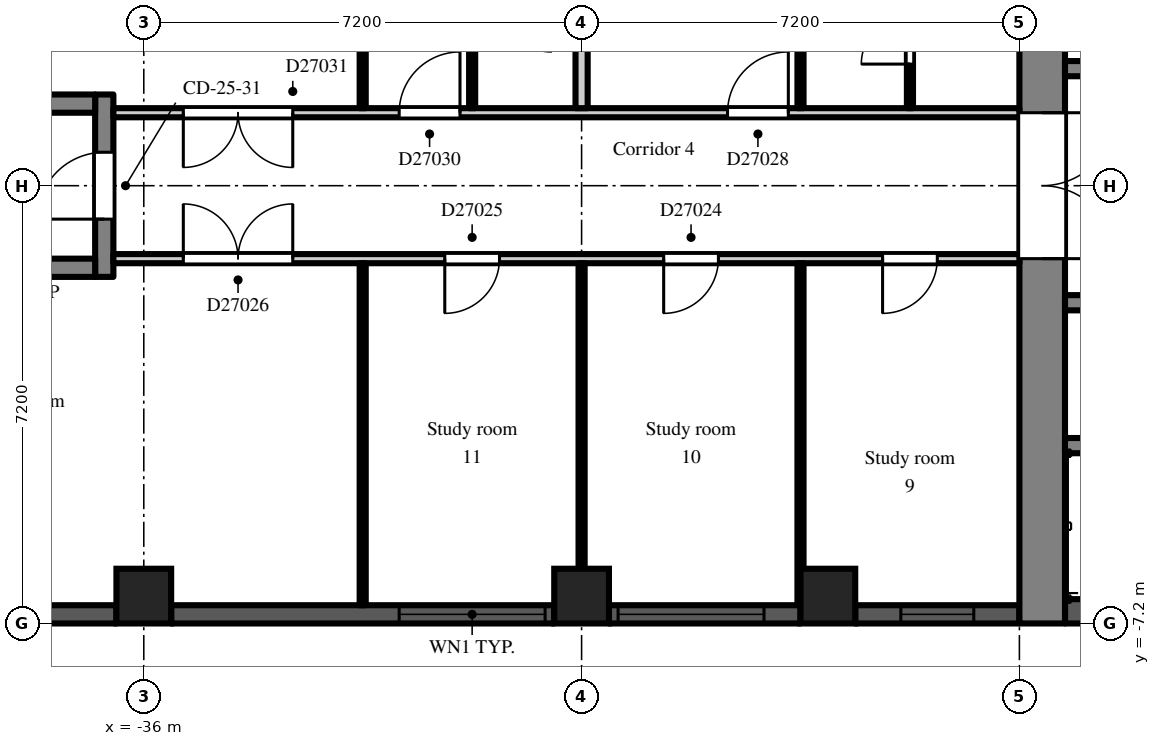
"""IFC4 building model, lengths in metres.
Left out: names, types, materials, properties, quantities, classifications, styles, units other than length and angle.
Written with IfcOpenShell. Run it as: python <this file> out.ifc"""

import sys

from ifc_helpers import new_model, si_unit, direction, frame, frame_2d, origin, origin_2d, place, context, subcontext, project, spatial, rectangle, extrude, element, fill, save


model = new_model("IFC4")
c1 = context("Model", 3, precision=1e-05, world=origin(), true_north=direction((0.0, 1.0)))
c2 = subcontext(c1, "Body", "Model", "MODEL_VIEW")
j1 = project(units=[si_unit("LENGTHUNIT", "METRE"), si_unit("PLANEANGLEUNIT", "RADIAN")], contexts=[c1])
p1 = place(None, origin())
s1 = spatial("IfcSite", under=j1, at=p1, CompositionType="ELEMENT")
p2 = place(p1, origin())
s2 = spatial("IfcBuilding", under=s1, at=p2, CompositionType="ELEMENT")
p3 = place(p2, frame((0.0, 0.0, 191.7)))
s3 = spatial("IfcBuildingStorey", under=s2, at=p3, CompositionType="ELEMENT", Elevation=191.7)
for number, where, z_axis, x_axis in (
    (1, (-36.0, -6.75, 0.0), (0.0, 0.0, 1.0), (1.0, 0.0, 0.0)),
    (2, (-28.8, -6.75, 0.0), (0.0, 0.0, 1.0), (1.0, 0.0, 0.0)),
    (3, (-24.75, -6.75, 0.0), (0.0, 0.0, 1.0), (1.0, 0.0, 0.0)),
):
    element("IfcColumn", number, at=place(p3, frame(where, z_axis=z_axis, x_axis=x_axis)), inside=s3, PredefinedType="COLUMN", context=c2, shape_type="SweptSolid", body=[
        extrude(rectangle(XDim=0.9, YDim=0.9, at=origin_2d()), origin(), (0.0, 0.0, 1.0), 3.0),
    ])
p4 = place(p3, frame((-38.7, -7.05, 0.0), z_axis=(0.0, 0.0, 1.0), x_axis=(1.0, 0.0, 0.0)))
e4 = element("IfcWall", 4, at=p4, inside=s3, PredefinedType="SOLIDWALL", context=c2, shape_type="SweptSolid", body=[
    extrude(rectangle(XDim=2.25, YDim=0.3, at=frame_2d((1.125, 0.0))), origin(), (0.0, 0.0, 1.0), 2.3),
])
p5 = place(p3, frame((-35.55, -7.05, 0.0), z_axis=(0.0, 0.0, 1.0), x_axis=(1.0, 0.0, 0.0)))
e5 = element("IfcWall", 5, at=p5, inside=s3, PredefinedType="SOLIDWALL", context=c2, shape_type="SweptSolid", body=[
    extrude(rectangle(XDim=6.3, YDim=0.3, at=frame_2d((3.15, 0.0))), origin(), (0.0, 0.0, 1.0), 2.3),
])
p6 = place(p5, frame((3.75, 0.0, 0.2)))
e6 = element("IfcOpeningElement", 6, at=p6, cuts=e5, PredefinedType="OPENING", context=c2, shape_type="SweptSolid", body=[
    extrude(rectangle(XDim=2.4, YDim=1.85, at=frame_2d((1.2, 0.925))), frame((0.0, 0.16, 0.0), z_axis=(0.0, -1.0, 0.0), x_axis=(1.0, 0.0, 0.0)), (0.0, 0.0, 1.0), 0.32),
])
p7 = place(p3, frame((-28.35, -7.05, 0.0), z_axis=(0.0, 0.0, 1.0), x_axis=(1.0, 0.0, 0.0)))
e7 = element("IfcWall", 7, at=p7, inside=s3, PredefinedType="SOLIDWALL", context=c2, shape_type="SweptSolid", body=[
    extrude(rectangle(XDim=3.15, YDim=0.3, at=frame_2d((1.575, 0.0))), origin(), (0.0, 0.0, 1.0), 2.3),
])
p8 = place(p7, frame((0.15, 0.0, 0.2)))
e8 = element("IfcOpeningElement", 8, at=p8, cuts=e7, PredefinedType="OPENING", context=c2, shape_type="SweptSolid", body=[
    extrude(rectangle(XDim=2.4, YDim=1.85, at=frame_2d((1.2, 0.925))), frame((0.0, 0.16, 0.0), z_axis=(0.0, -1.0, 0.0), x_axis=(1.0, 0.0, 0.0)), (0.0, 0.0, 1.0), 0.32),
])
p9 = place(p3, frame((-24.3, -7.05, 0.0), z_axis=(0.0, 0.0, 1.0), x_axis=(1.0, 0.0, 0.0)))
e9 = element("IfcWall", 9, at=p9, inside=s3, PredefinedType="SOLIDWALL", context=c2, shape_type="SweptSolid", body=[
    extrude(rectangle(XDim=2.7, YDim=0.3, at=frame_2d((1.35, 0.0))), origin(), (0.0, 0.0, 1.0), 2.3),
])
p10 = place(p9, frame((0.75, 0.0, 0.2)))
e10 = element("IfcOpeningElement", 10, at=p10, cuts=e9, PredefinedType="OPENING", context=c2, shape_type="SweptSolid", body=[
    extrude(rectangle(XDim=1.2, YDim=1.85, at=frame_2d((0.6, 0.925))), frame((0.0, 0.16, 0.0), z_axis=(0.0, -1.0, 0.0), x_axis=(1.0, 0.0, 0.0)), (0.0, 0.0, 1.0), 0.32),
])
p11 = place(p3, frame((-21.225, -7.2, 0.0), z_axis=(0.0, 0.0, 1.0), x_axis=(0.0, 1.0, 0.0)))
e11 = element("IfcWall", 11, at=p11, inside=s3, PredefinedType="SHEAR", context=c2, shape_type="SweptSolid", body=[
    extrude(rectangle(XDim=14.4, YDim=0.75, at=frame_2d((7.2, 0.0))), origin(), (0.0, 0.0, 1.0), 2.55),
])
p12 = place(p11, frame((6.0, 0.0, 0.0)))
e12 = element("IfcOpeningElement", 12, at=p12, cuts=e11, PredefinedType="OPENING", context=c2, shape_type="SweptSolid", body=[
    extrude(rectangle(XDim=2.4, YDim=2.2, at=frame_2d((1.2, 1.1))), frame((0.0, 0.385, 0.0), z_axis=(0.0, -1.0, 0.0), x_axis=(1.0, 0.0, 0.0)), (0.0, 0.0, 1.0), 0.77),
])
p13 = place(p3, frame((-7.9, 1.925, 0.0), z_axis=(0.0, 0.0, 1.0), x_axis=(-1.0, 0.0, 0.0)))
e13 = element("IfcWall", 13, at=p13, inside=s3, PredefinedType="SHEAR", context=c2, shape_type="SweptSolid", body=[
    extrude(rectangle(XDim=12.95, YDim=0.25, at=frame_2d((6.475, 0.0))), origin(), (0.0, 0.0, 1.0), 2.55),
])
p14 = place(p13, frame((4.825, 0.0, 0.0)))
e14 = element("IfcOpeningElement", 14, at=p14, cuts=e13, PredefinedType="OPENING", context=c2, shape_type="SweptSolid", body=[
    extrude(rectangle(XDim=1.1, YDim=2.1, at=frame_2d((0.55, 1.05))), frame((0.0, 0.135, 0.0), z_axis=(0.0, -1.0, 0.0), x_axis=(1.0, 0.0, 0.0)), (0.0, 0.0, 1.0), 0.27),
])
p15 = place(p13, frame((7.025, 0.0, 0.0)))
e15 = element("IfcOpeningElement", 15, at=p15, cuts=e13, PredefinedType="OPENING", context=c2, shape_type="SweptSolid", body=[
    extrude(rectangle(XDim=1.1, YDim=2.1, at=frame_2d((0.55, 1.05))), frame((0.0, 0.135, 0.0), z_axis=(0.0, -1.0, 0.0), x_axis=(1.0, 0.0, 0.0)), (0.0, 0.0, 1.0), 0.27),
])
p16 = place(p13, frame((9.225, 0.0, 0.0)))
e16 = element("IfcOpeningElement", 16, at=p16, cuts=e13, PredefinedType="OPENING", context=c2, shape_type="SweptSolid", body=[
    extrude(rectangle(XDim=1.1, YDim=2.1, at=frame_2d((0.55, 1.05))), frame((0.0, 0.135, 0.0), z_axis=(0.0, -1.0, 0.0), x_axis=(1.0, 0.0, 0.0)), (0.0, 0.0, 1.0), 0.27),
])
p17 = place(p13, frame((0.525, 0.0, 0.0)))
e17 = element("IfcOpeningElement", 17, at=p17, cuts=e13, PredefinedType="OPENING", context=c2, shape_type="SweptSolid", body=[
    extrude(rectangle(XDim=0.9, YDim=2.1, at=frame_2d((0.45, 1.05))), frame((0.0, 0.135, 0.0), z_axis=(0.0, -1.0, 0.0), x_axis=(1.0, 0.0, 0.0)), (0.0, 0.0, 1.0), 0.27),
])
p18 = place(p13, frame((2.625, 0.0, 0.0)))
e18 = element("IfcOpeningElement", 18, at=p18, cuts=e13, PredefinedType="OPENING", context=c2, shape_type="SweptSolid", body=[
    extrude(rectangle(XDim=1.1, YDim=2.1, at=frame_2d((0.55, 1.05))), frame((0.0, 0.135, 0.0), z_axis=(0.0, -1.0, 0.0), x_axis=(1.0, 0.0, 0.0)), (0.0, 0.0, 1.0), 0.27),
])
p19 = place(p13, frame((11.525, 0.0, 0.0)))
e19 = element("IfcOpeningElement", 19, at=p19, cuts=e13, PredefinedType="OPENING", context=c2, shape_type="SweptSolid", body=[
    extrude(rectangle(XDim=0.9, YDim=2.1, at=frame_2d((0.45, 1.05))), frame((0.0, 0.135, 0.0), z_axis=(0.0, -1.0, 0.0), x_axis=(1.0, 0.0, 0.0)), (0.0, 0.0, 1.0), 0.27),
])
p20 = place(p3, frame((-7.9, -7.0, 0.0), z_axis=(0.0, 0.0, 1.0), x_axis=(-1.0, 0.0, 0.0)))
e20 = element("IfcWall", 20, at=p20, inside=s3, PredefinedType="SHEAR", context=c2, shape_type="SweptSolid", body=[
    extrude(rectangle(XDim=12.95, YDim=0.4, at=frame_2d((6.475, 0.0))), origin(), (0.0, 0.0, 1.0), 2.55),
])
p21 = place(p3, frame((-7.9, -1.925, 0.0), z_axis=(0.0, 0.0, 1.0), x_axis=(-1.0, 0.0, 0.0)))
e21 = element("IfcWall", 21, at=p21, inside=s3, PredefinedType="SHEAR", context=c2, shape_type="SweptSolid", body=[
    extrude(rectangle(XDim=12.95, YDim=0.25, at=frame_2d((6.475, 0.0))), origin(), (0.0, 0.0, 1.0), 2.55),
])
p22 = place(p21, frame((0.525, 0.0, 0.0)))
e22 = element("IfcOpeningElement", 22, at=p22, cuts=e21, PredefinedType="OPENING", context=c2, shape_type="SweptSolid", body=[
    extrude(rectangle(XDim=0.9, YDim=2.1, at=frame_2d((0.45, 1.05))), frame((0.0, 0.135, 0.0), z_axis=(0.0, -1.0, 0.0), x_axis=(1.0, 0.0, 0.0)), (0.0, 0.0, 1.0), 0.27),
])
p23 = place(p21, frame((2.625, 0.0, 0.0)))
e23 = element("IfcOpeningElement", 23, at=p23, cuts=e21, PredefinedType="OPENING", context=c2, shape_type="SweptSolid", body=[
    extrude(rectangle(XDim=1.1, YDim=2.1, at=frame_2d((0.55, 1.05))), frame((0.0, 0.135, 0.0), z_axis=(0.0, -1.0, 0.0), x_axis=(1.0, 0.0, 0.0)), (0.0, 0.0, 1.0), 0.27),
])
p24 = place(p21, frame((8.225, 0.0, 0.0)))
e24 = element("IfcOpeningElement", 24, at=p24, cuts=e21, PredefinedType="OPENING", context=c2, shape_type="SweptSolid", body=[
    extrude(rectangle(XDim=0.9, YDim=2.1, at=frame_2d((0.45, 1.05))), frame((0.0, 0.135, 0.0), z_axis=(0.0, -1.0, 0.0), x_axis=(1.0, 0.0, 0.0)), (0.0, 0.0, 1.0), 0.27),
])
p25 = place(p3, frame((-12.3, -4.275, 0.0), z_axis=(0.0, 0.0, 1.0), x_axis=(-1.0, 0.0, 0.0)))
e25 = element("IfcWall", 25, at=p25, inside=s3, PredefinedType="SHEAR", context=c2, shape_type="SweptSolid", body=[
    extrude(rectangle(XDim=8.55, YDim=0.25, at=frame_2d((4.275, 0.0))), origin(), (0.0, 0.0, 1.0), 2.55),
])
p26 = place(p3, frame((-36.65, -1.5, 0.0), z_axis=(0.0, 0.0, 1.0), x_axis=(0.0, 1.0, 0.0)))
e26 = element("IfcWall", 26, at=p26, inside=s3, PredefinedType="SHEAR", context=c2, shape_type="SweptSolid", body=[
    extrude(rectangle(XDim=3.0, YDim=0.3, at=frame_2d((1.5, 0.0))), origin(), (0.0, 0.0, 1.0), 2.55),
])
p27 = place(p26, frame((0.95, 0.0, 0.0)))
e27 = element("IfcOpeningElement", 27, at=p27, cuts=e26, PredefinedType="OPENING", context=c2, shape_type="SweptSolid", body=[
    extrude(rectangle(XDim=1.1, YDim=2.1, at=frame_2d((0.55, 1.05))), frame((0.0, 0.16, 0.0), z_axis=(0.0, -1.0, 0.0), x_axis=(1.0, 0.0, 0.0)), (0.0, 0.0, 1.0), 0.32),
])
for number, where, z_axis, x_axis in (
    (28, (-36.8, -1.35, 0.0), (0.0, 0.0, 1.0), (-1.0, 0.0, 0.0)),
    (29, (-36.8, 1.35, 0.0), (0.0, 0.0, 1.0), (-1.0, 0.0, 0.0)),
):
    element("IfcWall", number, at=place(p3, frame(where, z_axis=z_axis, x_axis=x_axis)), inside=s3, PredefinedType="SHEAR", context=c2, shape_type="SweptSolid", body=[
        extrude(rectangle(XDim=5.8, YDim=0.3, at=frame_2d((2.9, 0.0))), origin(), (0.0, 0.0, 1.0), 2.55),
    ])
p28 = place(p3, frame((-36.5, -1.2, 0.0), z_axis=(0.0, 0.0, 1.0), x_axis=(1.0, 0.0, 0.0)))
e30 = element("IfcWall", 30, at=p28, inside=s3, PredefinedType="PARTITIONING", context=c2, shape_type="SweptSolid", body=[
    extrude(rectangle(XDim=14.9, YDim=0.15, at=frame_2d((7.45, 0.0))), origin(), (0.0, 0.0, 1.0), 2.55),
])
p29 = place(p28, frame((12.65, 0.0, 0.0)))
e31 = element("IfcOpeningElement", 31, at=p29, cuts=e30, PredefinedType="OPENING", context=c2, shape_type="SweptSolid", body=[
    extrude(rectangle(XDim=0.9, YDim=2.1, at=frame_2d((0.45, 1.05))), frame((0.0, 0.085, 0.0), z_axis=(0.0, -1.0, 0.0), x_axis=(1.0, 0.0, 0.0)), (0.0, 0.0, 1.0), 0.17),
])
p30 = place(p28, frame((9.05, 0.0, 0.0)))
e32 = element("IfcOpeningElement", 32, at=p30, cuts=e30, PredefinedType="OPENING", context=c2, shape_type="SweptSolid", body=[
    extrude(rectangle(XDim=0.9, YDim=2.1, at=frame_2d((0.45, 1.05))), frame((0.0, 0.085, 0.0), z_axis=(0.0, -1.0, 0.0), x_axis=(1.0, 0.0, 0.0)), (0.0, 0.0, 1.0), 0.17),
])
p31 = place(p28, frame((5.45, 0.0, 0.0)))
e33 = element("IfcOpeningElement", 33, at=p31, cuts=e30, PredefinedType="OPENING", context=c2, shape_type="SweptSolid", body=[
    extrude(rectangle(XDim=0.9, YDim=2.1, at=frame_2d((0.45, 1.05))), frame((0.0, 0.085, 0.0), z_axis=(0.0, -1.0, 0.0), x_axis=(1.0, 0.0, 0.0)), (0.0, 0.0, 1.0), 0.17),
])
p32 = place(p28, frame((1.15, 0.0, 0.0)))
e34 = element("IfcOpeningElement", 34, at=p32, cuts=e30, PredefinedType="OPENING", context=c2, shape_type="SweptSolid", body=[
    extrude(rectangle(XDim=1.8, YDim=2.1, at=frame_2d((0.9, 1.05))), frame((0.0, 0.085, 0.0), z_axis=(0.0, -1.0, 0.0), x_axis=(1.0, 0.0, 0.0)), (0.0, 0.0, 1.0), 0.17),
])
p33 = place(p3, frame((-36.5, 1.2, 0.0), z_axis=(0.0, 0.0, 1.0), x_axis=(1.0, 0.0, 0.0)))
e35 = element("IfcWall", 35, at=p33, inside=s3, PredefinedType="PARTITIONING", context=c2, shape_type="SweptSolid", body=[
    extrude(rectangle(XDim=14.9, YDim=0.15, at=frame_2d((7.45, 0.0))), origin(), (0.0, 0.0, 1.0), 2.55),
])
p34 = place(p33, frame((10.1, 0.0, 0.0)))
e36 = element("IfcOpeningElement", 36, at=p34, cuts=e35, PredefinedType="OPENING", context=c2, shape_type="SweptSolid", body=[
    extrude(rectangle(XDim=1.0, YDim=2.1, at=frame_2d((0.5, 1.05))), frame((0.0, 0.085, 0.0), z_axis=(0.0, -1.0, 0.0), x_axis=(1.0, 0.0, 0.0)), (0.0, 0.0, 1.0), 0.17),
])
p35 = place(p33, frame((4.7, 0.0, 0.0)))
e37 = element("IfcOpeningElement", 37, at=p35, cuts=e35, PredefinedType="OPENING", context=c2, shape_type="SweptSolid", body=[
    extrude(rectangle(XDim=1.0, YDim=2.1, at=frame_2d((0.5, 1.05))), frame((0.0, 0.085, 0.0), z_axis=(0.0, -1.0, 0.0), x_axis=(1.0, 0.0, 0.0)), (0.0, 0.0, 1.0), 0.17),
])
p36 = place(p33, frame((1.15, 0.0, 0.0)))
e38 = element("IfcOpeningElement", 38, at=p36, cuts=e35, PredefinedType="OPENING", context=c2, shape_type="SweptSolid", body=[
    extrude(rectangle(XDim=1.8, YDim=2.1, at=frame_2d((0.9, 1.05))), frame((0.0, 0.085, 0.0), z_axis=(0.0, -1.0, 0.0), x_axis=(1.0, 0.0, 0.0)), (0.0, 0.0, 1.0), 0.17),
])
for number, where, z_axis, x_axis in (
    (39, (-32.4, -6.9, 0.0), (0.0, 0.0, 1.0), (0.0, 1.0, 0.0)),
    (40, (-32.4, 1.275, 0.0), (0.0, 0.0, 1.0), (0.0, 1.0, 0.0)),
):
    element("IfcWall", number, at=place(p3, frame(where, z_axis=z_axis, x_axis=x_axis)), inside=s3, PredefinedType="PARTITIONING", context=c2, shape_type="SweptSolid", body=[
        extrude(rectangle(XDim=5.625, YDim=0.1, at=frame_2d((2.812, 0.0))), origin(), (0.0, 0.0, 1.0), 2.55),
    ])
p37 = place(p3, frame((-30.6, 1.275, 0.0), z_axis=(0.0, 0.0, 1.0), x_axis=(0.0, 1.0, 0.0)))
e41 = element("IfcWall", 41, at=p37, inside=s3, PredefinedType="PARTITIONING", context=c2, shape_type="SweptSolid", body=[
    extrude(rectangle(XDim=1.775, YDim=0.1, at=frame_2d((0.888, 0.0))), origin(), (0.0, 0.0, 1.0), 2.55),
])
p38 = place(p3, frame((-28.8, -6.9, 0.0), z_axis=(0.0, 0.0, 1.0), x_axis=(0.0, 1.0, 0.0)))
e42 = element("IfcWall", 42, at=p38, inside=s3, PredefinedType="PARTITIONING", context=c2, shape_type="SweptSolid", body=[
    extrude(rectangle(XDim=5.625, YDim=0.1, at=frame_2d((2.812, 0.0))), origin(), (0.0, 0.0, 1.0), 2.55),
])
p39 = place(p3, frame((-28.8, 1.275, 0.0), z_axis=(0.0, 0.0, 1.0), x_axis=(0.0, 1.0, 0.0)))
e43 = element("IfcWall", 43, at=p39, inside=s3, PredefinedType="PARTITIONING", context=c2, shape_type="SweptSolid", body=[
    extrude(rectangle(XDim=5.625, YDim=0.2, at=frame_2d((2.812, 0.0))), origin(), (0.0, 0.0, 1.0), 2.55),
])
p40 = place(p3, frame((-25.2, -6.9, 0.0), z_axis=(0.0, 0.0, 1.0), x_axis=(0.0, 1.0, 0.0)))
e44 = element("IfcWall", 44, at=p40, inside=s3, PredefinedType="PARTITIONING", context=c2, shape_type="SweptSolid", body=[
    extrude(rectangle(XDim=5.625, YDim=0.1, at=frame_2d((2.812, 0.0))), origin(), (0.0, 0.0, 1.0), 2.55),
])
p41 = place(p3, frame((-25.2, 1.275, 0.0), z_axis=(0.0, 0.0, 1.0), x_axis=(0.0, 1.0, 0.0)))
e45 = element("IfcWall", 45, at=p41, inside=s3, PredefinedType="PARTITIONING", context=c2, shape_type="SweptSolid", body=[
    extrude(rectangle(XDim=2.375, YDim=0.1, at=frame_2d((1.188, 0.0))), origin(), (0.0, 0.0, 1.0), 2.55),
])
p42 = place(p3, frame((-23.4, 1.275, 0.0), z_axis=(0.0, 0.0, 1.0), x_axis=(0.0, 1.0, 0.0)))
e46 = element("IfcWall", 46, at=p42, inside=s3, PredefinedType="PARTITIONING", context=c2, shape_type="SweptSolid", body=[
    extrude(rectangle(XDim=2.275, YDim=0.1, at=frame_2d((1.138, 0.0))), origin(), (0.0, 0.0, 1.0), 2.55),
])
p43 = place(p42, frame((0.725, 0.0, 0.0)))
e47 = element("IfcOpeningElement", 47, at=p43, cuts=e46, PredefinedType="OPENING", context=c2, shape_type="SweptSolid", body=[
    extrude(rectangle(XDim=0.8, YDim=2.1, at=frame_2d((0.4, 1.05))), frame((0.0, 0.06, 0.0), z_axis=(0.0, -1.0, 0.0), x_axis=(1.0, 0.0, 0.0)), (0.0, 0.0, 1.0), 0.12),
])
p44 = place(p6, origin())
e48 = element("IfcWindow", 48, at=p44, inside=s3, PartitioningType="SINGLE_PANEL", PredefinedType="WINDOW", context=c2, shape_type="SweptSolid", body=[
    extrude(rectangle(XDim=2.4, YDim=1.85, at=frame_2d((1.2, 0.925))), frame((0.0, 0.03, 0.0), z_axis=(0.0, -1.0, 0.0), x_axis=(1.0, 0.0, 0.0)), (0.0, 0.0, 1.0), 0.06),
])
fill(e6, e48)
p45 = place(p8, origin())
e49 = element("IfcWindow", 49, at=p45, inside=s3, PartitioningType="SINGLE_PANEL", PredefinedType="WINDOW", context=c2, shape_type="SweptSolid", body=[
    extrude(rectangle(XDim=2.4, YDim=1.85, at=frame_2d((1.2, 0.925))), frame((0.0, 0.03, 0.0), z_axis=(0.0, -1.0, 0.0), x_axis=(1.0, 0.0, 0.0)), (0.0, 0.0, 1.0), 0.06),
])
fill(e8, e49)
p46 = place(p10, origin())
e50 = element("IfcWindow", 50, at=p46, inside=s3, PartitioningType="SINGLE_PANEL", PredefinedType="WINDOW", context=c2, shape_type="SweptSolid", body=[
    extrude(rectangle(XDim=1.2, YDim=1.85, at=frame_2d((0.6, 0.925))), frame((0.0, 0.03, 0.0), z_axis=(0.0, -1.0, 0.0), x_axis=(1.0, 0.0, 0.0)), (0.0, 0.0, 1.0), 0.06),
])
fill(e10, e50)
p47 = place(p12, frame((2.4, 0.0, 0.0), z_axis=(0.0, 0.0, 1.0), x_axis=(-1.0, 0.0, 0.0)))
e51 = element("IfcDoor", 51, at=p47, inside=s3, OperationType="DOUBLE_DOOR_DOUBLE_SWING", PredefinedType="DOOR", context=c2, shape_type="SweptSolid", body=[
    extrude(rectangle(XDim=2.4, YDim=2.2, at=frame_2d((1.2, 1.1))), frame((0.0, 0.025, 0.0), z_axis=(0.0, -1.0, 0.0), x_axis=(1.0, 0.0, 0.0)), (0.0, 0.0, 1.0), 0.05),
])
fill(e12, e51)
p48 = place(p27, origin())
e52 = element("IfcDoor", 52, at=p48, inside=s3, OperationType="SINGLE_SWING_LEFT", PredefinedType="DOOR", context=c2, shape_type="SweptSolid", body=[
    extrude(rectangle(XDim=1.1, YDim=2.1, at=frame_2d((0.55, 1.05))), frame((0.0, 0.025, 0.0), z_axis=(0.0, -1.0, 0.0), x_axis=(1.0, 0.0, 0.0)), (0.0, 0.0, 1.0), 0.05),
])
fill(e27, e52)
p49 = place(p29, frame((0.9, 0.0, 0.0), z_axis=(0.0, 0.0, 1.0), x_axis=(-1.0, 0.0, 0.0)))
e53 = element("IfcDoor", 53, at=p49, inside=s3, OperationType="SINGLE_SWING_RIGHT", PredefinedType="DOOR", context=c2, shape_type="SweptSolid", body=[
    extrude(rectangle(XDim=0.9, YDim=2.1, at=frame_2d((0.45, 1.05))), frame((0.0, 0.025, 0.0), z_axis=(0.0, -1.0, 0.0), x_axis=(1.0, 0.0, 0.0)), (0.0, 0.0, 1.0), 0.05),
])
fill(e31, e53)
p50 = place(p30, frame((0.9, 0.0, 0.0), z_axis=(0.0, 0.0, 1.0), x_axis=(-1.0, 0.0, 0.0)))
e54 = element("IfcDoor", 54, at=p50, inside=s3, OperationType="SINGLE_SWING_RIGHT", PredefinedType="DOOR", context=c2, shape_type="SweptSolid", body=[
    extrude(rectangle(XDim=0.9, YDim=2.1, at=frame_2d((0.45, 1.05))), frame((0.0, 0.025, 0.0), z_axis=(0.0, -1.0, 0.0), x_axis=(1.0, 0.0, 0.0)), (0.0, 0.0, 1.0), 0.05),
])
fill(e32, e54)
p51 = place(p31, frame((0.9, 0.0, 0.0), z_axis=(0.0, 0.0, 1.0), x_axis=(-1.0, 0.0, 0.0)))
e55 = element("IfcDoor", 55, at=p51, inside=s3, OperationType="SINGLE_SWING_RIGHT", PredefinedType="DOOR", context=c2, shape_type="SweptSolid", body=[
    extrude(rectangle(XDim=0.9, YDim=2.1, at=frame_2d((0.45, 1.05))), frame((0.0, 0.025, 0.0), z_axis=(0.0, -1.0, 0.0), x_axis=(1.0, 0.0, 0.0)), (0.0, 0.0, 1.0), 0.05),
])
fill(e33, e55)
p52 = place(p32, origin())
e56 = element("IfcDoor", 56, at=p52, inside=s3, OperationType="DOUBLE_DOOR_DOUBLE_SWING", PredefinedType="DOOR", context=c2, shape_type="SweptSolid", body=[
    extrude(rectangle(XDim=1.8, YDim=2.1, at=frame_2d((0.9, 1.05))), frame((0.0, 0.025, 0.0), z_axis=(0.0, -1.0, 0.0), x_axis=(1.0, 0.0, 0.0)), (0.0, 0.0, 1.0), 0.05),
])
fill(e34, e56)
p53 = place(p43, origin())
e57 = element("IfcDoor", 57, at=p53, inside=s3, OperationType="SINGLE_SWING_LEFT", PredefinedType="DOOR", context=c2, shape_type="SweptSolid", body=[
    extrude(rectangle(XDim=0.8, YDim=2.1, at=frame_2d((0.4, 1.05))), frame((0.0, 0.025, 0.0), z_axis=(0.0, -1.0, 0.0), x_axis=(1.0, 0.0, 0.0)), (0.0, 0.0, 1.0), 0.05),
])
fill(e47, e57)
p54 = place(p34, origin())
e58 = element("IfcDoor", 58, at=p54, inside=s3, OperationType="SINGLE_SWING_RIGHT", PredefinedType="DOOR", context=c2, shape_type="SweptSolid", body=[
    extrude(rectangle(XDim=1.0, YDim=2.1, at=frame_2d((0.5, 1.05))), frame((0.0, 0.025, 0.0), z_axis=(0.0, -1.0, 0.0), x_axis=(1.0, 0.0, 0.0)), (0.0, 0.0, 1.0), 0.05),
])
fill(e36, e58)
p55 = place(p35, origin())
e59 = element("IfcDoor", 59, at=p55, inside=s3, OperationType="SINGLE_SWING_RIGHT", PredefinedType="DOOR", context=c2, shape_type="SweptSolid", body=[
    extrude(rectangle(XDim=1.0, YDim=2.1, at=frame_2d((0.5, 1.05))), frame((0.0, 0.025, 0.0), z_axis=(0.0, -1.0, 0.0), x_axis=(1.0, 0.0, 0.0)), (0.0, 0.0, 1.0), 0.05),
])
fill(e37, e59)
p56 = place(p36, frame((1.8, 0.0, 0.0), z_axis=(0.0, 0.0, 1.0), x_axis=(-1.0, 0.0, 0.0)))
e60 = element("IfcDoor", 60, at=p56, inside=s3, OperationType="DOUBLE_DOOR_DOUBLE_SWING", PredefinedType="DOOR", context=c2, shape_type="SweptSolid", body=[
    extrude(rectangle(XDim=1.8, YDim=2.1, at=frame_2d((0.9, 1.05))), frame((0.0, 0.025, 0.0), z_axis=(0.0, -1.0, 0.0), x_axis=(1.0, 0.0, 0.0)), (0.0, 0.0, 1.0), 0.05),
])
fill(e38, e60)
save(model, sys.argv[1])
